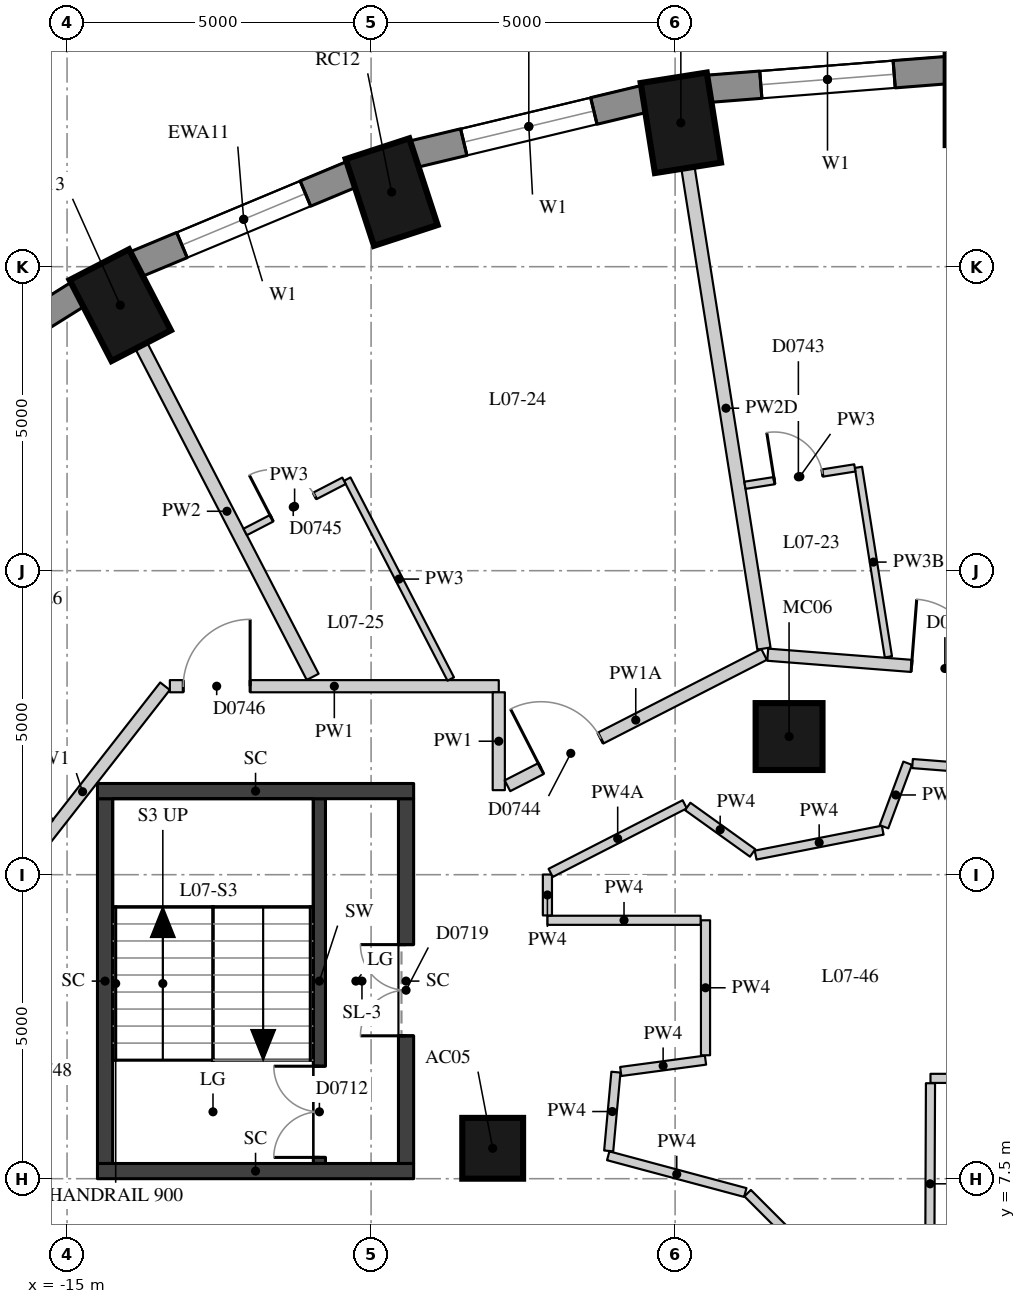
"""IFC4 building model, lengths in metres.
Left out: names, types, materials, properties, quantities, classifications, styles, units other than length and angle.
Written with IfcOpenShell. Run it as: python <this file> out.ifc"""

import sys

from ifc_helpers import new_model, si_unit, direction, frame, frame_2d, origin, origin_2d, place, context, subcontext, project, spatial, rectangle, extrude, element, fill, save


model = new_model("IFC4")
c1 = context("Model", 3, precision=1e-05, world=origin(), true_north=direction((0.0, 1.0)))
c2 = subcontext(c1, "Body", "Model", "MODEL_VIEW")
j1 = project(units=[si_unit("LENGTHUNIT", "METRE"), si_unit("PLANEANGLEUNIT", "RADIAN")], contexts=[c1])
p1 = place(None, origin())
s1 = spatial("IfcSite", under=j1, at=p1, CompositionType="ELEMENT")
p2 = place(p1, origin())
s2 = spatial("IfcBuilding", under=s1, at=p2, CompositionType="ELEMENT")
p3 = place(p2, frame((0.0, 0.0, 31.6)))
s3 = spatial("IfcBuildingStorey", under=s2, at=p3, CompositionType="ELEMENT", Elevation=31.6)
for number, where, z_axis, x_axis in (
    (1, (-4.906, 24.866, 0.0), (0.0, 0.0, 1.0), (-0.156, 0.988, 0.0)),
    (2, (-9.662, 23.727, 0.0), (0.0, 0.0, 1.0), (-0.31, 0.951, 0.0)),
    (3, (-14.125, 21.867, 0.0), (0.0, 0.0, 1.0), (-0.46, 0.888, 0.0)),
):
    element("IfcColumn", number, at=place(p3, frame(where, z_axis=z_axis, x_axis=x_axis)), inside=s3, PredefinedType="COLUMN", context=c2, shape_type="SweptSolid", body=[
        extrude(rectangle(XDim=1.5, YDim=1.1, at=origin_2d()), origin(), (0.0, 0.0, 1.0), 3.3),
    ])
p4 = place(p3, frame((-8.0, 8.0, 0.0), z_axis=(0.0, 0.0, 1.0), x_axis=(1.0, 0.0, 0.0)))
e4 = element("IfcColumn", 4, at=p4, inside=s3, PredefinedType="COLUMN", context=c2, shape_type="SweptSolid", body=[
    extrude(rectangle(XDim=1.0, YDim=1.0, at=origin_2d()), origin(), (0.0, 0.0, 1.0), 3.3),
])
p5 = place(p3, frame((-3.126, 14.772, 0.0), z_axis=(0.0, 0.0, 1.0), x_axis=(1.0, 0.0, 0.0)))
e5 = element("IfcColumn", 5, at=p5, inside=s3, PredefinedType="COLUMN", context=c2, shape_type="SweptSolid", body=[
    extrude(rectangle(XDim=1.1, YDim=1.1, at=origin_2d()), origin(), (0.0, 0.0, 1.0), 3.3),
])
p6 = place(p3, frame((-0.53, 25.733, 0.0), z_axis=(0.0, 0.0, 1.0), x_axis=(-0.996955972145, -0.077966592873, 0.0)))
e6 = element("IfcWall", 6, at=p6, inside=s3, PredefinedType="SOLIDWALL", context=c2, shape_type="SweptSolid", body=[
    extrude(rectangle(XDim=3.939, YDim=0.45, at=frame_2d((1.97, 0.0))), origin(), (0.0, 0.0, 1.0), 3.02),
])
p7 = place(p6, frame((0.87, 0.0, 0.4)))
e7 = element("IfcOpeningElement", 7, at=p7, cuts=e6, PredefinedType="OPENING", context=c2, shape_type="SweptSolid", body=[
    extrude(rectangle(XDim=2.2, YDim=1.75, at=frame_2d((1.1, 0.875))), frame((0.0, 0.235, 0.0), z_axis=(0.0, -1.0, 0.0), x_axis=(1.0, 0.0, 0.0)), (0.0, 0.0, 1.0), 0.47),
])
p8 = place(p3, frame((-5.504, 25.26, 0.0), z_axis=(0.0, 0.0, 1.0), x_axis=(-0.972496561493, -0.232917233979, 0.0)))
e8 = element("IfcWall", 8, at=p8, inside=s3, PredefinedType="SOLIDWALL", context=c2, shape_type="SweptSolid", body=[
    extrude(rectangle(XDim=3.911, YDim=0.45, at=frame_2d((1.956, 0.0))), origin(), (0.0, 0.0, 1.0), 3.02),
])
p9 = place(p8, frame((0.855, 0.0, 0.4)))
e9 = element("IfcOpeningElement", 9, at=p9, cuts=e8, PredefinedType="OPENING", context=c2, shape_type="SweptSolid", body=[
    extrude(rectangle(XDim=2.2, YDim=1.75, at=frame_2d((1.1, 0.875))), frame((0.0, 0.235, 0.0), z_axis=(0.0, -1.0, 0.0), x_axis=(1.0, 0.0, 0.0)), (0.0, 0.0, 1.0), 0.47),
])
p10 = place(p3, frame((-10.315, 24.021, 0.0), z_axis=(0.0, 0.0, 1.0), x_axis=(-0.923031964282, -0.384723267966, 0.0)))
e10 = element("IfcWall", 10, at=p10, inside=s3, PredefinedType="SOLIDWALL", context=c2, shape_type="SweptSolid", body=[
    extrude(rectangle(XDim=3.856, YDim=0.45, at=frame_2d((1.928, 0.0))), origin(), (0.0, 0.0, 1.0), 3.02),
])
p11 = place(p10, frame((0.828, 0.0, 0.4)))
e11 = element("IfcOpeningElement", 11, at=p11, cuts=e10, PredefinedType="OPENING", context=c2, shape_type="SweptSolid", body=[
    extrude(rectangle(XDim=2.2, YDim=1.75, at=frame_2d((1.1, 0.875))), frame((0.0, 0.235, 0.0), z_axis=(0.0, -1.0, 0.0), x_axis=(1.0, 0.0, 0.0)), (0.0, 0.0, 1.0), 0.47),
])
p12 = place(p3, frame((-14.817, 22.051, 0.0), z_axis=(0.0, 0.0, 1.0), x_axis=(-0.847635480093, -0.530579016629, 0.0)))
e12 = element("IfcWall", 12, at=p12, inside=s3, PredefinedType="SOLIDWALL", context=c2, shape_type="SweptSolid", body=[
    extrude(rectangle(XDim=3.782, YDim=0.45, at=frame_2d((1.891, 0.0))), origin(), (0.0, 0.0, 1.0), 3.02),
])
p13 = place(p12, frame((0.791, 0.0, 0.4)))
e13 = element("IfcOpeningElement", 13, at=p13, cuts=e12, PredefinedType="OPENING", context=c2, shape_type="SweptSolid", body=[
    extrude(rectangle(XDim=2.2, YDim=1.75, at=frame_2d((1.1, 0.875))), frame((0.0, 0.235, 0.0), z_axis=(0.0, -1.0, 0.0), x_axis=(1.0, 0.0, 0.0)), (0.0, 0.0, 1.0), 0.47),
])
p14 = place(p3, frame((-10.85, 7.75, 0.0), z_axis=(0.0, 0.0, 1.0), x_axis=(0.0, 1.0, 0.0)))
e14 = element("IfcWall", 14, at=p14, inside=s3, PredefinedType="SHEAR", context=c2, shape_type="SweptSolid", body=[
    extrude(rectangle(XDim=6.0, YDim=0.2, at=frame_2d((3.0, 0.0))), origin(), (0.0, 0.0, 1.0), 3.02),
])
p15 = place(p14, frame((0.1, 0.0, 0.0)))
e15 = element("IfcOpeningElement", 15, at=p15, cuts=e14, PredefinedType="OPENING", context=c2, shape_type="SweptSolid", body=[
    extrude(rectangle(XDim=1.5, YDim=2.1, at=frame_2d((0.75, 1.05))), frame((0.0, 0.11, 0.0), z_axis=(0.0, -1.0, 0.0), x_axis=(1.0, 0.0, 0.0)), (0.0, 0.0, 1.0), 0.22),
])
p16 = place(p3, frame((-14.375, 7.75, -0.28), z_axis=(0.0, 0.0, 1.0), x_axis=(0.0, 1.0, 0.0)))
e16 = element("IfcWall", 16, at=p16, inside=s3, PredefinedType="SHEAR", context=c2, shape_type="SweptSolid", body=[
    extrude(rectangle(XDim=6.0, YDim=0.25, at=frame_2d((3.0, 0.0))), origin(), (0.0, 0.0, 1.0), 3.3),
])
p17 = place(p3, frame((-9.425, 7.75, -0.28), z_axis=(0.0, 0.0, 1.0), x_axis=(0.0, 1.0, 0.0)))
e17 = element("IfcWall", 17, at=p17, inside=s3, PredefinedType="SHEAR", context=c2, shape_type="SweptSolid", body=[
    extrude(rectangle(XDim=6.0, YDim=0.25, at=frame_2d((3.0, 0.0))), origin(), (0.0, 0.0, 1.0), 3.3),
])
p18 = place(p17, frame((2.1, 0.0, 0.28)))
e18 = element("IfcOpeningElement", 18, at=p18, cuts=e17, PredefinedType="OPENING", context=c2, shape_type="SweptSolid", body=[
    extrude(rectangle(XDim=1.5, YDim=2.1, at=frame_2d((0.75, 1.05))), frame((0.0, 0.135, 0.0), z_axis=(0.0, -1.0, 0.0), x_axis=(1.0, 0.0, 0.0)), (0.0, 0.0, 1.0), 0.27),
])
for number, where, z_axis, x_axis in (
    (19, (-14.5, 13.875, -0.28), (0.0, 0.0, 1.0), (1.0, 0.0, 0.0)),
    (20, (-14.5, 7.625, -0.28), (0.0, 0.0, 1.0), (1.0, 0.0, 0.0)),
):
    element("IfcWall", number, at=place(p3, frame(where, z_axis=z_axis, x_axis=x_axis)), inside=s3, PredefinedType="SHEAR", context=c2, shape_type="SweptSolid", body=[
        extrude(rectangle(XDim=5.2, YDim=0.25, at=frame_2d((2.6, 0.0))), origin(), (0.0, 0.0, 1.0), 3.3),
    ])
p19 = place(p3, frame((-16.1, 12.13, 0.0), z_axis=(0.0, 0.0, 1.0), x_axis=(0.615593476668, 0.788063875256, 0.0)))
e21 = element("IfcWall", 21, at=p19, inside=s3, PredefinedType="PARTITIONING", context=c2, shape_type="SweptSolid", body=[
    extrude(rectangle(XDim=4.404, YDim=0.2, at=frame_2d((2.202, 0.0))), origin(), (0.0, 0.0, 1.0), 3.02),
])
p20 = place(p3, frame((-13.309, 15.6, 0.0), z_axis=(0.0, 0.0, 1.0), x_axis=(1.0, 0.0, 0.0)))
e22 = element("IfcWall", 22, at=p20, inside=s3, PredefinedType="PARTITIONING", context=c2, shape_type="SweptSolid", body=[
    extrude(rectangle(XDim=5.409, YDim=0.2, at=frame_2d((2.705, 0.0))), origin(), (0.0, 0.0, 1.0), 3.02),
])
p21 = place(p20, frame((0.22, 0.0, 0.0)))
e23 = element("IfcOpeningElement", 23, at=p21, cuts=e22, PredefinedType="OPENING", context=c2, shape_type="SweptSolid", body=[
    extrude(rectangle(XDim=1.1, YDim=2.1, at=frame_2d((0.55, 1.05))), frame((0.0, 0.11, 0.0), z_axis=(0.0, -1.0, 0.0), x_axis=(1.0, 0.0, 0.0)), (0.0, 0.0, 1.0), 0.22),
])
p22 = place(p3, frame((-7.9, 15.5, 0.0), z_axis=(0.0, 0.0, 1.0), x_axis=(0.0, -1.0, 0.0)))
e24 = element("IfcWall", 24, at=p22, inside=s3, PredefinedType="PARTITIONING", context=c2, shape_type="SweptSolid", body=[
    extrude(rectangle(XDim=1.61, YDim=0.2, at=frame_2d((0.805, 0.0))), origin(), (0.0, 0.0, 1.0), 3.02),
])
p23 = place(p3, frame((-7.757, 13.963, 0.0), z_axis=(0.0, 0.0, 1.0), x_axis=(0.89017531408, 0.455618162722, 0.0)))
e25 = element("IfcWall", 25, at=p23, inside=s3, PredefinedType="PARTITIONING", context=c2, shape_type="SweptSolid", body=[
    extrude(rectangle(XDim=4.741, YDim=0.2, at=frame_2d((2.371, 0.0))), origin(), (0.0, 0.0, 1.0), 2.57),
])
p24 = place(p23, frame((0.62, 0.0, 0.0)))
e26 = element("IfcOpeningElement", 26, at=p24, cuts=e25, PredefinedType="OPENING", context=c2, shape_type="SweptSolid", body=[
    extrude(rectangle(XDim=1.1, YDim=2.1, at=frame_2d((0.55, 1.05))), frame((0.0, 0.11, 0.0), z_axis=(0.0, -1.0, 0.0), x_axis=(1.0, 0.0, 0.0)), (0.0, 0.0, 1.0), 0.22),
])
p25 = place(p3, frame((-3.477, 16.118, 0.0), z_axis=(0.0, 0.0, 1.0), x_axis=(0.996970328684, -0.077782798383, 0.0)))
e27 = element("IfcWall", 27, at=p25, inside=s3, PredefinedType="PARTITIONING", context=c2, shape_type="SweptSolid", body=[
    extrude(rectangle(XDim=10.449, YDim=0.2, at=frame_2d((5.225, 0.0))), origin(), (0.0, 0.0, 1.0), 3.02),
])
p26 = place(p25, frame((2.372, 0.0, 0.0)))
e28 = element("IfcOpeningElement", 28, at=p26, cuts=e27, PredefinedType="OPENING", context=c2, shape_type="SweptSolid", body=[
    extrude(rectangle(XDim=1.1, YDim=2.1, at=frame_2d((0.55, 1.05))), frame((0.0, 0.11, 0.0), z_axis=(0.0, -1.0, 0.0), x_axis=(1.0, 0.0, 0.0)), (0.0, 0.0, 1.0), 0.22),
])
p27 = place(p3, frame((-3.676, 12.822, 0.0), z_axis=(0.0, 0.0, 1.0), x_axis=(0.981284032016, 0.192565958858, 0.0)))
e29 = element("IfcWall", 29, at=p27, inside=s3, PredefinedType="PARTITIONING", context=c2, shape_type="SweptSolid", body=[
    extrude(rectangle(XDim=2.13, YDim=0.15, at=frame_2d((1.065, 0.0))), origin(), (0.0, 0.0, 1.0), 3.02),
])
p28 = place(p3, frame((-1.564, 13.289, 0.0), z_axis=(0.0, 0.0, 1.0), x_axis=(0.348554808131, 0.937288400509, 0.0)))
e30 = element("IfcWall", 30, at=p28, inside=s3, PredefinedType="PARTITIONING", context=c2, shape_type="SweptSolid", body=[
    extrude(rectangle(XDim=1.115, YDim=0.15, at=frame_2d((0.558, 0.0))), origin(), (0.0, 0.0, 1.0), 3.02),
])
p29 = place(p3, frame((-1.096, 14.328, 0.0), z_axis=(0.0, 0.0, 1.0), x_axis=(0.996959190057, -0.077925434624, 0.0)))
e31 = element("IfcWall", 31, at=p29, inside=s3, PredefinedType="PARTITIONING", context=c2, shape_type="SweptSolid", body=[
    extrude(rectangle(XDim=2.309, YDim=0.15, at=frame_2d((1.155, 0.0))), origin(), (0.0, 0.0, 1.0), 2.42),
])
p30 = place(p29, frame((0.705, 0.0, 0.0)))
e32 = element("IfcOpeningElement", 32, at=p30, cuts=e31, PredefinedType="OPENING", context=c2, shape_type="SweptSolid", body=[
    extrude(rectangle(XDim=0.9, YDim=2.1, at=frame_2d((0.45, 1.05))), frame((0.0, 0.085, 0.0), z_axis=(0.0, -1.0, 0.0), x_axis=(1.0, 0.0, 0.0)), (0.0, 0.0, 1.0), 0.17),
])
p31 = place(p3, frame((1.32, 9.15, 0.0), z_axis=(0.0, 0.0, 1.0), x_axis=(-1.0, 0.0, 0.0)))
e33 = element("IfcWall", 33, at=p31, inside=s3, PredefinedType="PARTITIONING", context=c2, shape_type="SweptSolid", body=[
    extrude(rectangle(XDim=2.12, YDim=0.15, at=frame_2d((1.06, 0.0))), origin(), (0.0, 0.0, 1.0), 3.02),
])
p32 = place(p3, frame((-0.8, 9.07, 0.0), z_axis=(0.0, 0.0, 1.0), x_axis=(-0.003911409193, -0.99999235041, 0.0)))
e34 = element("IfcWall", 34, at=p32, inside=s3, PredefinedType="PARTITIONING", context=c2, shape_type="SweptSolid", body=[
    extrude(rectangle(XDim=3.308, YDim=0.15, at=frame_2d((1.654, 0.0))), origin(), (0.0, 0.0, 1.0), 3.02),
])
p33 = place(p3, frame((-1.973, 5.428, 0.0), z_axis=(0.0, 0.0, 1.0), x_axis=(-0.707106781187, 0.707106781187, 0.0)))
e35 = element("IfcWall", 35, at=p33, inside=s3, PredefinedType="PARTITIONING", context=c2, shape_type="SweptSolid", body=[
    extrude(rectangle(XDim=2.593, YDim=0.15, at=frame_2d((1.297, 0.0))), origin(), (0.0, 0.0, 1.0), 3.02),
])
p34 = place(p3, frame((-3.846, 7.272, 0.0), z_axis=(0.0, 0.0, 1.0), x_axis=(-0.965906023197, 0.258892939941, 0.0)))
e36 = element("IfcWall", 36, at=p34, inside=s3, PredefinedType="PARTITIONING", context=c2, shape_type="SweptSolid", body=[
    extrude(rectangle(XDim=2.334, YDim=0.15, at=frame_2d((1.167, 0.0))), origin(), (0.0, 0.0, 1.0), 3.02),
])
p35 = place(p3, frame((-6.092, 7.957, 0.0), z_axis=(0.0, 0.0, 1.0), x_axis=(0.091567710563, 0.99579885237, 0.0)))
e37 = element("IfcWall", 37, at=p35, inside=s3, PredefinedType="PARTITIONING", context=c2, shape_type="SweptSolid", body=[
    extrude(rectangle(XDim=1.301, YDim=0.15, at=frame_2d((0.65, 0.0))), origin(), (0.0, 0.0, 1.0), 3.02),
])
p36 = place(p3, frame((-5.894, 9.263, 0.0), z_axis=(0.0, 0.0, 1.0), x_axis=(0.991144324173, 0.132789038177, 0.0)))
e38 = element("IfcWall", 38, at=p36, inside=s3, PredefinedType="PARTITIONING", context=c2, shape_type="SweptSolid", body=[
    extrude(rectangle(XDim=1.406, YDim=0.15, at=frame_2d((0.703, 0.0))), origin(), (0.0, 0.0, 1.0), 3.02),
])
p37 = place(p3, frame((-4.5, 9.53, 0.0), z_axis=(0.0, 0.0, 1.0), x_axis=(0.0, 1.0, 0.0)))
e39 = element("IfcWall", 39, at=p37, inside=s3, PredefinedType="PARTITIONING", context=c2, shape_type="SweptSolid", body=[
    extrude(rectangle(XDim=2.22, YDim=0.15, at=frame_2d((1.11, 0.0))), origin(), (0.0, 0.0, 1.0), 3.02),
])
p38 = place(p3, frame((-4.58, 11.75, 0.0), z_axis=(0.0, 0.0, 1.0), x_axis=(-1.0, 0.0, 0.0)))
e40 = element("IfcWall", 40, at=p38, inside=s3, PredefinedType="PARTITIONING", context=c2, shape_type="SweptSolid", body=[
    extrude(rectangle(XDim=2.52, YDim=0.15, at=frame_2d((1.26, 0.0))), origin(), (0.0, 0.0, 1.0), 3.02),
])
p39 = place(p3, frame((-7.1, 11.83, 0.0), z_axis=(0.0, 0.0, 1.0), x_axis=(0.0, 1.0, 0.0)))
e41 = element("IfcWall", 41, at=p39, inside=s3, PredefinedType="PARTITIONING", context=c2, shape_type="SweptSolid", body=[
    extrude(rectangle(XDim=0.672, YDim=0.15, at=frame_2d((0.336, 0.0))), origin(), (0.0, 0.0, 1.0), 3.02),
])
p40 = place(p3, frame((-7.047, 12.53, 0.0), z_axis=(0.0, 0.0, 1.0), x_axis=(0.890208185307, 0.455553934032, 0.0)))
e42 = element("IfcWall", 42, at=p40, inside=s3, PredefinedType="PARTITIONING", context=c2, shape_type="SweptSolid", body=[
    extrude(rectangle(XDim=2.477, YDim=0.15, at=frame_2d((1.238, 0.0))), origin(), (0.0, 0.0, 1.0), 2.57),
])
p41 = place(p3, frame((-4.793, 13.623, 0.0), z_axis=(0.0, 0.0, 1.0), x_axis=(0.812853780358, -0.582467794611, 0.0)))
e43 = element("IfcWall", 43, at=p41, inside=s3, PredefinedType="PARTITIONING", context=c2, shape_type="SweptSolid", body=[
    extrude(rectangle(XDim=1.314, YDim=0.15, at=frame_2d((0.657, 0.0))), origin(), (0.0, 0.0, 1.0), 3.02),
])
p42 = place(p3, frame((-4.788, 24.125, 0.0), z_axis=(0.0, 0.0, 1.0), x_axis=(0.156108238506, -0.987739954578, 0.0)))
e44 = element("IfcWall", 44, at=p42, inside=s3, PredefinedType="PARTITIONING", context=c2, shape_type="SweptSolid", body=[
    extrude(rectangle(XDim=8.004, YDim=0.22, at=frame_2d((4.002, 0.0))), origin(), (0.0, 0.0, 1.0), 2.47),
])
p43 = place(p3, frame((-13.78, 21.201, 0.0), z_axis=(0.0, 0.0, 1.0), x_axis=(0.459699000582, -0.888074787878, 0.0)))
e45 = element("IfcWall", 45, at=p43, inside=s3, PredefinedType="PARTITIONING", context=c2, shape_type="SweptSolid", body=[
    extrude(rectangle(XDim=6.134, YDim=0.22, at=frame_2d((3.067, 0.0))), origin(), (0.0, 0.0, 1.0), 3.02),
])
p44 = place(p3, frame((-1.492, 16.083, 0.0), z_axis=(0.0, 0.0, 1.0), x_axis=(-0.156073831214, 0.987745391895, 0.0)))
e46 = element("IfcWall", 46, at=p44, inside=s3, PredefinedType="PARTITIONING", context=c2, shape_type="SweptSolid", body=[
    extrude(rectangle(XDim=3.155, YDim=0.12, at=frame_2d((1.578, 0.0))), origin(), (0.0, 0.0, 1.0), 2.47),
])
p45 = place(p3, frame((-8.69, 15.718, 0.0), z_axis=(0.0, 0.0, 1.0), x_axis=(-0.45967225044, 0.888088634189, 0.0)))
e47 = element("IfcWall", 47, at=p45, inside=s3, PredefinedType="PARTITIONING", context=c2, shape_type="SweptSolid", body=[
    extrude(rectangle(XDim=3.702, YDim=0.12, at=frame_2d((1.851, 0.0))), origin(), (0.0, 0.0, 1.0), 3.02),
])
p46 = place(p3, frame((-15.267, 13.359, 0.0), z_axis=(0.0, 0.0, 1.0), x_axis=(-0.730103481834, 0.683336597742, 0.0)))
e48 = element("IfcWall", 48, at=p46, inside=s3, PredefinedType="PARTITIONING", context=c2, shape_type="SweptSolid", body=[
    extrude(rectangle(XDim=1.989, YDim=0.12, at=frame_2d((0.995, 0.0))), origin(), (0.0, 0.0, 1.0), 3.02),
])
p47 = place(p3, frame((-2.044, 19.19, 0.0), z_axis=(0.0, 0.0, 1.0), x_axis=(-0.987722911621, -0.15621603586, 0.0)))
e49 = element("IfcWall", 49, at=p47, inside=s3, PredefinedType="PARTITIONING", context=c2, shape_type="SweptSolid", body=[
    extrude(rectangle(XDim=1.83, YDim=0.12, at=frame_2d((0.915, 0.0))), origin(), (0.0, 0.0, 1.0), 3.02),
])
p48 = place(p47, frame((0.54, 0.0, 0.0)))
e50 = element("IfcOpeningElement", 50, at=p48, cuts=e49, PredefinedType="OPENING", context=c2, shape_type="SweptSolid", body=[
    extrude(rectangle(XDim=0.8, YDim=2.1, at=frame_2d((0.4, 1.05))), frame((0.0, 0.07, 0.0), z_axis=(0.0, -1.0, 0.0), x_axis=(1.0, 0.0, 0.0)), (0.0, 0.0, 1.0), 0.14),
])
p49 = place(p3, frame((-10.445, 18.978, 0.0), z_axis=(0.0, 0.0, 1.0), x_axis=(-0.888095574179, -0.459658842104, 0.0)))
e51 = element("IfcWall", 51, at=p49, inside=s3, PredefinedType="PARTITIONING", context=c2, shape_type="SweptSolid", body=[
    extrude(rectangle(XDim=1.83, YDim=0.12, at=frame_2d((0.915, 0.0))), origin(), (0.0, 0.0, 1.0), 3.02),
])
p50 = place(p49, frame((0.54, 0.0, 0.0)))
e52 = element("IfcOpeningElement", 52, at=p50, cuts=e51, PredefinedType="OPENING", context=c2, shape_type="SweptSolid", body=[
    extrude(rectangle(XDim=0.8, YDim=2.1, at=frame_2d((0.4, 1.05))), frame((0.0, 0.07, 0.0), z_axis=(0.0, -1.0, 0.0), x_axis=(1.0, 0.0, 0.0)), (0.0, 0.0, 1.0), 0.14),
])
p51 = place(p7, origin())
e53 = element("IfcWindow", 53, at=p51, inside=s3, PartitioningType="SINGLE_PANEL", PredefinedType="WINDOW", context=c2, shape_type="SweptSolid", body=[
    extrude(rectangle(XDim=2.2, YDim=1.75, at=frame_2d((1.1, 0.875))), frame((0.0, 0.035, 0.0), z_axis=(0.0, -1.0, 0.0), x_axis=(1.0, 0.0, 0.0)), (0.0, 0.0, 1.0), 0.06),
])
fill(e7, e53)
p52 = place(p9, origin())
e54 = element("IfcWindow", 54, at=p52, inside=s3, PartitioningType="SINGLE_PANEL", PredefinedType="WINDOW", context=c2, shape_type="SweptSolid", body=[
    extrude(rectangle(XDim=2.2, YDim=1.75, at=frame_2d((1.1, 0.875))), frame((0.0, 0.035, 0.0), z_axis=(0.0, -1.0, 0.0), x_axis=(1.0, 0.0, 0.0)), (0.0, 0.0, 1.0), 0.06),
])
fill(e9, e54)
p53 = place(p11, origin())
e55 = element("IfcWindow", 55, at=p53, inside=s3, PartitioningType="SINGLE_PANEL", PredefinedType="WINDOW", context=c2, shape_type="SweptSolid", body=[
    extrude(rectangle(XDim=2.2, YDim=1.75, at=frame_2d((1.1, 0.875))), frame((0.0, 0.035, 0.0), z_axis=(0.0, -1.0, 0.0), x_axis=(1.0, 0.0, 0.0)), (0.0, 0.0, 1.0), 0.06),
])
fill(e11, e55)
p54 = place(p15, origin())
e56 = element("IfcDoor", 56, at=p54, inside=s3, OperationType="DOUBLE_DOOR_SINGLE_SWING", PredefinedType="DOOR", context=c2, shape_type="SweptSolid", body=[
    extrude(rectangle(XDim=1.5, YDim=2.1, at=frame_2d((0.75, 1.05))), frame((0.0, 0.025, 0.0), z_axis=(0.0, -1.0, 0.0), x_axis=(1.0, 0.0, 0.0)), (0.0, 0.0, 1.0), 0.05),
])
fill(e15, e56)
p55 = place(p18, origin())
e57 = element("IfcDoor", 57, at=p55, inside=s3, OperationType="DOUBLE_DOOR_SINGLE_SWING", PredefinedType="DOOR", context=c2, shape_type="SweptSolid", body=[
    extrude(rectangle(XDim=1.5, YDim=2.1, at=frame_2d((0.75, 1.05))), frame((0.0, 0.025, 0.0), z_axis=(0.0, -1.0, 0.0), x_axis=(1.0, 0.0, 0.0)), (0.0, 0.0, 1.0), 0.05),
])
fill(e18, e57)
p56 = place(p26, origin())
e58 = element("IfcDoor", 58, at=p56, inside=s3, OperationType="SINGLE_SWING_LEFT", PredefinedType="DOOR", context=c2, shape_type="SweptSolid", body=[
    extrude(rectangle(XDim=1.1, YDim=2.1, at=frame_2d((0.55, 1.05))), frame((0.0, 0.025, 0.0), z_axis=(0.0, -1.0, 0.0), x_axis=(1.0, 0.0, 0.0)), (0.0, 0.0, 1.0), 0.05),
])
fill(e28, e58)
p57 = place(p48, origin())
e59 = element("IfcDoor", 59, at=p57, inside=s3, OperationType="SINGLE_SWING_LEFT", PredefinedType="DOOR", context=c2, shape_type="SweptSolid", body=[
    extrude(rectangle(XDim=0.8, YDim=2.1, at=frame_2d((0.4, 1.05))), frame((0.0, 0.025, 0.0), z_axis=(0.0, -1.0, 0.0), x_axis=(1.0, 0.0, 0.0)), (0.0, 0.0, 1.0), 0.05),
])
fill(e50, e59)
p58 = place(p24, origin())
e60 = element("IfcDoor", 60, at=p58, inside=s3, OperationType="SINGLE_SWING_LEFT", PredefinedType="DOOR", context=c2, shape_type="SweptSolid", body=[
    extrude(rectangle(XDim=1.1, YDim=2.1, at=frame_2d((0.55, 1.05))), frame((0.0, 0.025, 0.0), z_axis=(0.0, -1.0, 0.0), x_axis=(1.0, 0.0, 0.0)), (0.0, 0.0, 1.0), 0.05),
])
fill(e26, e60)
p59 = place(p50, origin())
e61 = element("IfcDoor", 61, at=p59, inside=s3, OperationType="SINGLE_SWING_LEFT", PredefinedType="DOOR", context=c2, shape_type="SweptSolid", body=[
    extrude(rectangle(XDim=0.8, YDim=2.1, at=frame_2d((0.4, 1.05))), frame((0.0, 0.025, 0.0), z_axis=(0.0, -1.0, 0.0), x_axis=(1.0, 0.0, 0.0)), (0.0, 0.0, 1.0), 0.05),
])
fill(e52, e61)
p60 = place(p21, origin())
e62 = element("IfcDoor", 62, at=p60, inside=s3, OperationType="SINGLE_SWING_RIGHT", PredefinedType="DOOR", context=c2, shape_type="SweptSolid", body=[
    extrude(rectangle(XDim=1.1, YDim=2.1, at=frame_2d((0.55, 1.05))), frame((0.0, 0.025, 0.0), z_axis=(0.0, -1.0, 0.0), x_axis=(1.0, 0.0, 0.0)), (0.0, 0.0, 1.0), 0.05),
])
fill(e23, e62)
save(model, sys.argv[1])
